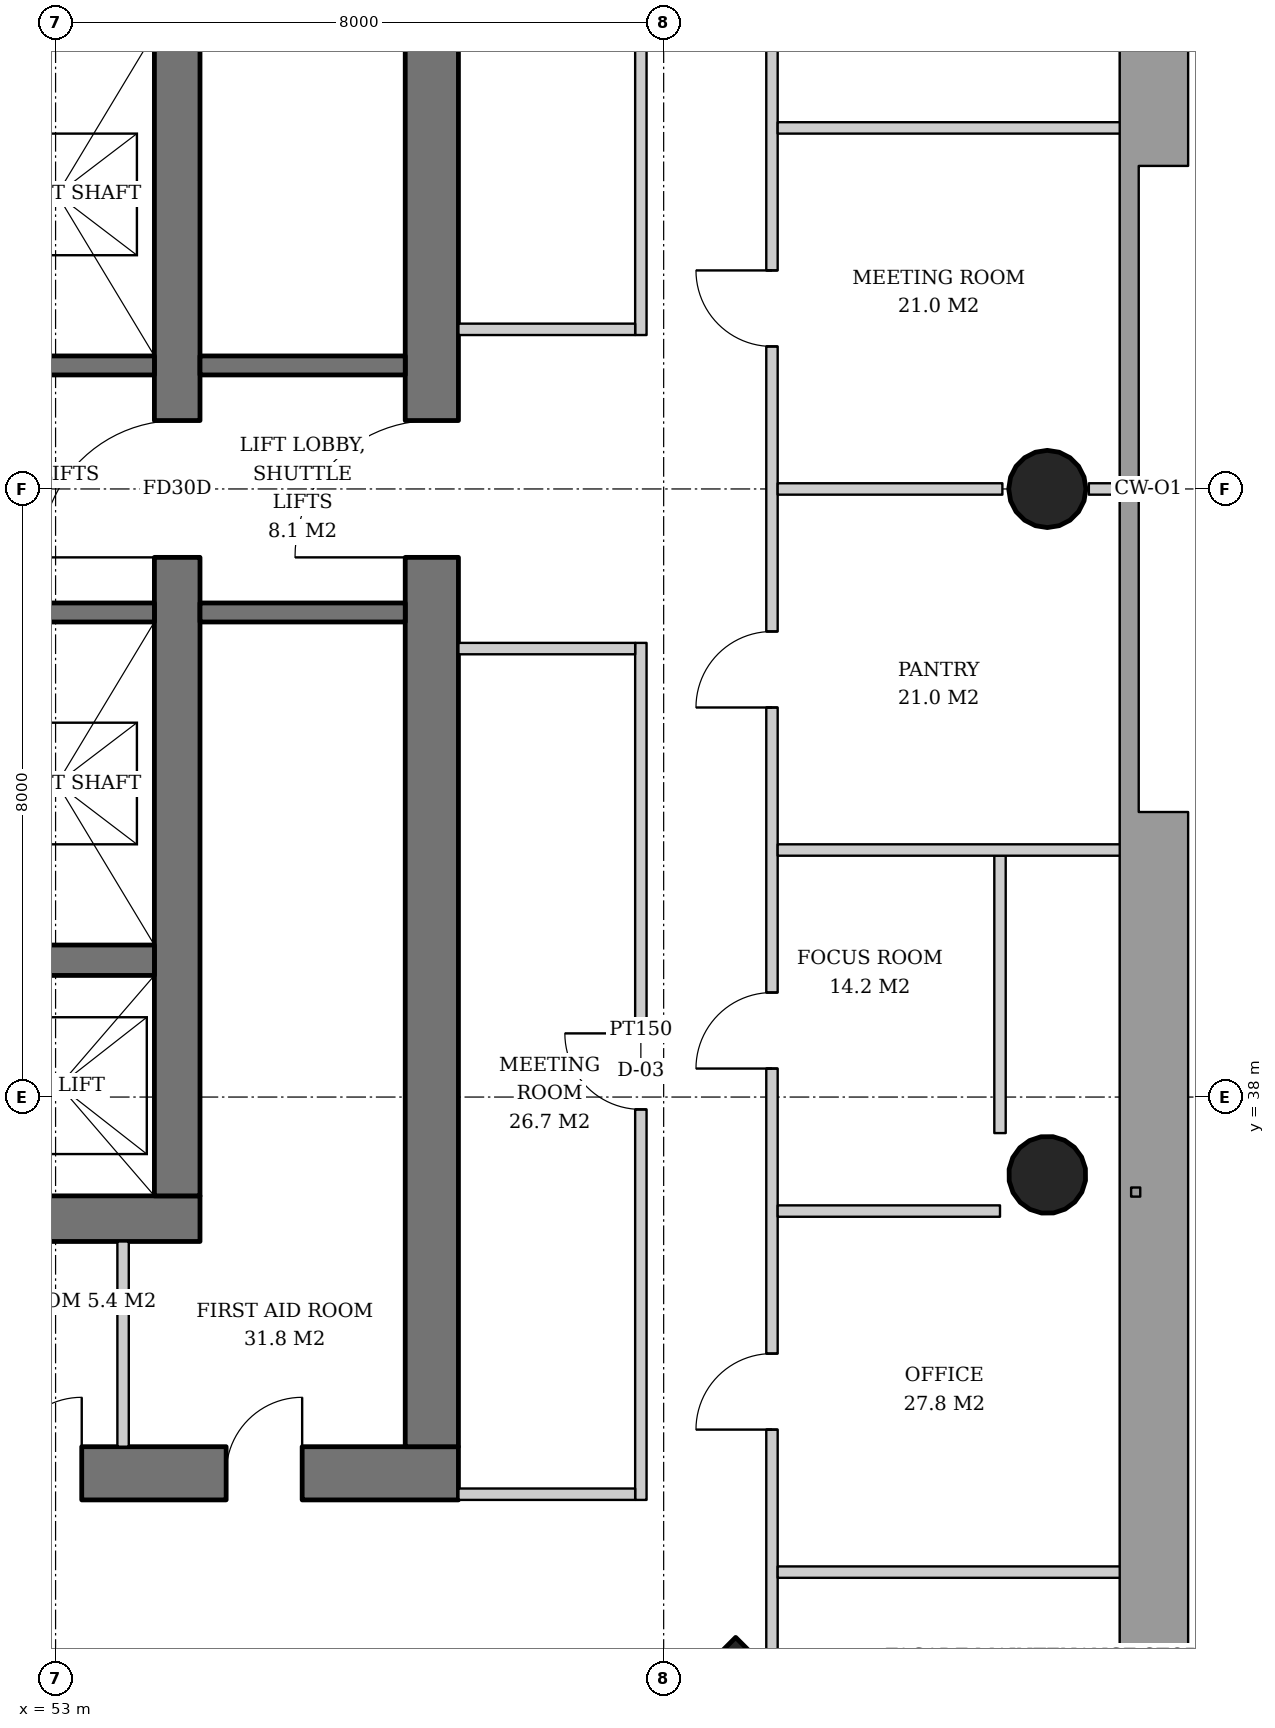
"""IFC4 building model, lengths in metres.
Left out: names, types, materials, properties, quantities, classifications, styles, units other than length and angle.
Written with IfcOpenShell. Run it as: python <this file> out.ifc"""

import sys

from ifc_helpers import new_model, si_unit, direction, frame, frame_2d, origin, origin_2d, place, context, subcontext, project, spatial, rectangle, hollow_circle, extrude, element, fill, save


model = new_model("IFC4")
c1 = context("Model", 3, precision=1e-05, world=origin(), true_north=direction((0.0, 1.0)))
c2 = subcontext(c1, "Body", "Model", "MODEL_VIEW")
j1 = project(units=[si_unit("LENGTHUNIT", "METRE"), si_unit("PLANEANGLEUNIT", "RADIAN")], contexts=[c1])
p1 = place(None, origin())
s1 = spatial("IfcSite", under=j1, at=p1, CompositionType="ELEMENT")
p2 = place(p1, origin())
s2 = spatial("IfcBuilding", under=s1, at=p2, CompositionType="ELEMENT")
p3 = place(p2, frame((0.0, 0.0, 112.2)))
s3 = spatial("IfcBuildingStorey", under=s2, at=p3, CompositionType="ELEMENT", Elevation=112.2)
p4 = place(p3, frame((66.086, 36.957, 0.0), z_axis=(-0.031910269556, 0.015987237665, 0.999362868496), x_axis=(-0.447933021895, -0.894067115991, 0.0)))
e1 = element("IfcColumn", 1, at=p4, inside=s3, PredefinedType="COLUMN", context=c2, shape_type="SweptSolid", body=[
    extrude(hollow_circle(Radius=0.508, WallThickness=0.04, at=origin_2d()), origin(), (0.0, 0.0, 1.0), 3.802),
])
p5 = place(p3, frame((66.086, 46.0, 0.0), z_axis=(-0.031914348339, 0.0, 0.999490607445), x_axis=(0.0, -1.0, 0.0)))
e2 = element("IfcColumn", 2, at=p5, inside=s3, PredefinedType="COLUMN", context=c2, shape_type="SweptSolid", body=[
    extrude(hollow_circle(Radius=0.508, WallThickness=0.04, at=origin_2d()), origin(), (0.0, 0.0, 1.0), 3.802),
])
p6 = place(p3, frame((61.986, 29.014, 0.0), z_axis=(-0.031898107953, 0.031898107953, 0.998981992539), x_axis=(-0.707106781187, -0.707106781187, 0.0)))
e3 = element("IfcColumn", 3, at=p6, inside=s3, PredefinedType="COLUMN", context=c2, shape_type="SweptSolid", body=[
    extrude(rectangle(XDim=2.6, YDim=2.6, at=origin_2d()), origin(), (0.0, 0.0, 1.0), 3.804),
])
p7 = place(p3, frame((35.1, 36.4, 0.0), z_axis=(0.0, 0.0, 1.0), x_axis=(1.0, 0.0, 0.0)))
e4 = element("IfcWall", 4, at=p7, inside=s3, PredefinedType="SHEAR", context=c2, shape_type="SweptSolid", body=[
    extrude(rectangle(XDim=19.8, YDim=0.6, at=frame_2d((9.9, 0.0))), origin(), (0.0, 0.0, 1.0), 3.8),
])
p8 = place(p7, frame((3.9, 0.0, 0.0)))
e5 = element("IfcOpeningElement", 5, at=p8, cuts=e4, PredefinedType="OPENING", context=c2, shape_type="SweptSolid", body=[
    extrude(rectangle(XDim=1.0, YDim=2.1, at=frame_2d((0.5, 1.05))), frame((0.0, 0.31, 0.0), z_axis=(0.0, -1.0, 0.0), x_axis=(1.0, 0.0, 0.0)), (0.0, 0.0, 1.0), 0.62),
])
p9 = place(p7, frame((15.35, 0.0, 0.0)))
e6 = element("IfcOpeningElement", 6, at=p9, cuts=e4, PredefinedType="OPENING", context=c2, shape_type="SweptSolid", body=[
    extrude(rectangle(XDim=1.0, YDim=2.1, at=frame_2d((0.5, 1.05))), frame((0.0, 0.31, 0.0), z_axis=(0.0, -1.0, 0.0), x_axis=(1.0, 0.0, 0.0)), (0.0, 0.0, 1.0), 0.62),
])
p10 = place(p3, frame((54.6, 36.7, 0.0), z_axis=(0.0, 0.0, 1.0), x_axis=(0.0, 1.0, 0.0)))
e7 = element("IfcWall", 7, at=p10, inside=s3, PredefinedType="SHEAR", context=c2, shape_type="SweptSolid", body=[
    extrude(rectangle(XDim=18.6, YDim=0.6, at=frame_2d((9.3, 0.0))), origin(), (0.0, 0.0, 1.0), 3.8),
])
p11 = place(p10, frame((8.4, 0.0, 0.0)))
e8 = element("IfcOpeningElement", 8, at=p11, cuts=e7, PredefinedType="OPENING", context=c2, shape_type="SweptSolid", body=[
    extrude(rectangle(XDim=1.8, YDim=2.4, at=frame_2d((0.9, 1.2))), frame((0.0, 0.31, 0.0), z_axis=(0.0, -1.0, 0.0), x_axis=(1.0, 0.0, 0.0)), (0.0, 0.0, 1.0), 0.62),
])
p12 = place(p3, frame((31.7, 33.05, 0.0), z_axis=(0.0, 0.0, 1.0), x_axis=(1.0, 0.0, 0.0)))
e9 = element("IfcWall", 9, at=p12, inside=s3, PredefinedType="SHEAR", context=c2, shape_type="SweptSolid", body=[
    extrude(rectangle(XDim=26.6, YDim=0.7, at=frame_2d((13.3, 0.0))), origin(), (0.0, 0.0, 1.0), 3.8),
])
p13 = place(p12, frame((7.3, 0.0, 0.0)))
e10 = element("IfcOpeningElement", 10, at=p13, cuts=e9, PredefinedType="OPENING", context=c2, shape_type="SweptSolid", body=[
    extrude(rectangle(XDim=1.0, YDim=2.1, at=frame_2d((0.5, 1.05))), frame((0.0, 0.36, 0.0), z_axis=(0.0, -1.0, 0.0), x_axis=(1.0, 0.0, 0.0)), (0.0, 0.0, 1.0), 0.72),
])
p14 = place(p12, frame((18.75, 0.0, 0.0)))
e11 = element("IfcOpeningElement", 11, at=p14, cuts=e9, PredefinedType="OPENING", context=c2, shape_type="SweptSolid", body=[
    extrude(rectangle(XDim=1.0, YDim=2.1, at=frame_2d((0.5, 1.05))), frame((0.0, 0.36, 0.0), z_axis=(0.0, -1.0, 0.0), x_axis=(1.0, 0.0, 0.0)), (0.0, 0.0, 1.0), 0.72),
])
p15 = place(p12, frame((1.85, 0.0, 0.0)))
e12 = element("IfcOpeningElement", 12, at=p15, cuts=e9, PredefinedType="OPENING", context=c2, shape_type="SweptSolid", body=[
    extrude(rectangle(XDim=1.0, YDim=2.1, at=frame_2d((0.5, 1.05))), frame((0.0, 0.36, 0.0), z_axis=(0.0, -1.0, 0.0), x_axis=(1.0, 0.0, 0.0)), (0.0, 0.0, 1.0), 0.72),
])
p16 = place(p12, frame((4.7, 0.0, 0.0)))
e13 = element("IfcOpeningElement", 13, at=p16, cuts=e9, PredefinedType="OPENING", context=c2, shape_type="SweptSolid", body=[
    extrude(rectangle(XDim=1.0, YDim=2.1, at=frame_2d((0.5, 1.05))), frame((0.0, 0.36, 0.0), z_axis=(0.0, -1.0, 0.0), x_axis=(1.0, 0.0, 0.0)), (0.0, 0.0, 1.0), 0.72),
])
p17 = place(p12, frame((12.44, 0.0, 0.0)))
e14 = element("IfcOpeningElement", 14, at=p17, cuts=e9, PredefinedType="OPENING", context=c2, shape_type="SweptSolid", body=[
    extrude(rectangle(XDim=1.0, YDim=2.1, at=frame_2d((0.5, 1.05))), frame((0.0, 0.36, 0.0), z_axis=(0.0, -1.0, 0.0), x_axis=(1.0, 0.0, 0.0)), (0.0, 0.0, 1.0), 0.72),
])
p18 = place(p12, frame((20.644, 0.0, 0.0)))
e15 = element("IfcOpeningElement", 15, at=p18, cuts=e9, PredefinedType="OPENING", context=c2, shape_type="SweptSolid", body=[
    extrude(rectangle(XDim=1.0, YDim=2.1, at=frame_2d((0.5, 1.05))), frame((0.0, 0.36, 0.0), z_axis=(0.0, -1.0, 0.0), x_axis=(1.0, 0.0, 0.0)), (0.0, 0.0, 1.0), 0.72),
])
p19 = place(p12, frame((23.544, 0.0, 0.0)))
e16 = element("IfcOpeningElement", 16, at=p19, cuts=e9, PredefinedType="OPENING", context=c2, shape_type="SweptSolid", body=[
    extrude(rectangle(XDim=1.0, YDim=2.1, at=frame_2d((0.5, 1.05))), frame((0.0, 0.36, 0.0), z_axis=(0.0, -1.0, 0.0), x_axis=(1.0, 0.0, 0.0)), (0.0, 0.0, 1.0), 0.72),
])
p20 = place(p3, frame((57.95, 33.4, 0.0), z_axis=(0.0, 0.0, 1.0), x_axis=(0.0, 1.0, 0.0)))
e17 = element("IfcWall", 17, at=p20, inside=s3, PredefinedType="SHEAR", context=c2, shape_type="SweptSolid", body=[
    extrude(rectangle(XDim=25.2, YDim=0.7, at=frame_2d((12.6, 0.0))), origin(), (0.0, 0.0, 1.0), 3.8),
])
p21 = place(p20, frame((11.7, 0.0, 0.0)))
e18 = element("IfcOpeningElement", 18, at=p21, cuts=e17, PredefinedType="OPENING", context=c2, shape_type="SweptSolid", body=[
    extrude(rectangle(XDim=1.8, YDim=2.4, at=frame_2d((0.9, 1.2))), frame((0.0, 0.36, 0.0), z_axis=(0.0, -1.0, 0.0), x_axis=(1.0, 0.0, 0.0)), (0.0, 0.0, 1.0), 0.72),
])
p22 = place(p3, frame((35.7, 39.8, 0.0), z_axis=(0.0, 0.0, 1.0), x_axis=(1.0, 0.0, 0.0)))
e19 = element("IfcWall", 19, at=p22, inside=s3, PredefinedType="SHEAR", context=c2, shape_type="SweptSolid", body=[
    extrude(rectangle(XDim=18.6, YDim=0.4, at=frame_2d((9.3, 0.0))), origin(), (0.0, 0.0, 1.0), 3.8),
])
for number, where, z_axis, x_axis in (
    (20, (48.93, 47.625, 0.0), (0.0, 0.0, 1.0), (1.0, 0.0, 0.0)),
    (21, (48.93, 44.375, 0.0), (0.0, 0.0, 1.0), (1.0, 0.0, 0.0)),
):
    element("IfcWall", number, at=place(p3, frame(where, z_axis=z_axis, x_axis=x_axis)), inside=s3, PredefinedType="SHEAR", context=c2, shape_type="SweptSolid", body=[
        extrude(rectangle(XDim=5.37, YDim=0.25, at=frame_2d((2.685, 0.0))), origin(), (0.0, 0.0, 1.0), 3.8),
    ])
for number, where, z_axis, x_axis in (
    (22, (54.9, 44.375, 0.0), (0.0, 0.0, 1.0), (1.0, 0.0, 0.0)),
    (23, (54.9, 47.625, 0.0), (0.0, 0.0, 1.0), (1.0, 0.0, 0.0)),
):
    element("IfcWall", number, at=place(p3, frame(where, z_axis=z_axis, x_axis=x_axis)), inside=s3, PredefinedType="SOLIDWALL", context=c2, shape_type="SweptSolid", body=[
        extrude(rectangle(XDim=2.7, YDim=0.25, at=frame_2d((1.35, 0.0))), origin(), (0.0, 0.0, 1.0), 3.62),
    ])
p23 = place(p3, frame((53.888, 33.4, 0.0), z_axis=(0.0, 0.0, 1.0), x_axis=(0.0, 1.0, 0.0)))
e24 = element("IfcWall", 24, at=p23, inside=s3, PredefinedType="SOLIDWALL", context=c2, shape_type="SweptSolid", body=[
    extrude(rectangle(XDim=2.7, YDim=0.15, at=frame_2d((1.35, 0.0))), origin(), (0.0, 0.0, 1.0), 3.62),
])
p24 = place(p3, frame((60.7, 32.7, 0.0), z_axis=(0.0, 0.0, 1.0), x_axis=(0.0, 1.0, 0.0)))
e25 = element("IfcWall", 25, at=p24, inside=s3, PredefinedType="PARTITIONING", context=c2, shape_type="SweptSolid", body=[
    extrude(rectangle(XDim=11.275, YDim=0.15, at=frame_2d((5.638, 0.0))), origin(), (0.0, 0.0, 1.0), 2.72),
])
p25 = place(p24, frame((5.137, 0.0, 0.0)))
e26 = element("IfcOpeningElement", 26, at=p25, cuts=e25, PredefinedType="OPENING", context=c2, shape_type="SweptSolid", body=[
    extrude(rectangle(XDim=1.0, YDim=2.1, at=frame_2d((0.5, 1.05))), frame((0.0, 0.085, 0.0), z_axis=(0.0, -1.0, 0.0), x_axis=(1.0, 0.0, 0.0)), (0.0, 0.0, 1.0), 0.17),
])
for number, where, z_axis, x_axis in (
    (27, (58.3, 32.775, 0.0), (0.0, 0.0, 1.0), (1.0, 0.0, 0.0)),
    (28, (58.3, 43.9, 0.0), (0.0, 0.0, 1.0), (1.0, 0.0, 0.0)),
):
    element("IfcWall", number, at=place(p3, frame(where, z_axis=z_axis, x_axis=x_axis)), inside=s3, PredefinedType="PARTITIONING", context=c2, shape_type="SweptSolid", body=[
        extrude(rectangle(XDim=2.325, YDim=0.15, at=frame_2d((1.163, 0.0))), origin(), (0.0, 0.0, 1.0), 3.62),
    ])
p26 = place(p3, frame((60.7, 48.025, 0.0), z_axis=(0.0, 0.0, 1.0), x_axis=(0.0, 1.0, 0.0)))
e29 = element("IfcWall", 29, at=p26, inside=s3, PredefinedType="PARTITIONING", context=c2, shape_type="SweptSolid", body=[
    extrude(rectangle(XDim=11.275, YDim=0.15, at=frame_2d((5.638, 0.0))), origin(), (0.0, 0.0, 1.0), 2.806),
])
p27 = place(p26, frame((5.137, 0.0, 0.0)))
e30 = element("IfcOpeningElement", 30, at=p27, cuts=e29, PredefinedType="OPENING", context=c2, shape_type="SweptSolid", body=[
    extrude(rectangle(XDim=1.0, YDim=2.1, at=frame_2d((0.5, 1.05))), frame((0.0, 0.085, 0.0), z_axis=(0.0, -1.0, 0.0), x_axis=(1.0, 0.0, 0.0)), (0.0, 0.0, 1.0), 0.17),
])
p28 = place(p3, frame((58.3, 48.1, 0.0), z_axis=(0.0, 0.0, 1.0), x_axis=(1.0, 0.0, 0.0)))
e31 = element("IfcWall", 31, at=p28, inside=s3, PredefinedType="PARTITIONING", context=c2, shape_type="SweptSolid", body=[
    extrude(rectangle(XDim=2.325, YDim=0.15, at=frame_2d((1.163, 0.0))), origin(), (0.0, 0.0, 1.0), 3.62),
])
p29 = place(p3, frame((65.425, 37.526, 0.0), z_axis=(0.0, 0.0, 1.0), x_axis=(0.0, 1.0, 0.0)))
e32 = element("IfcWall", 32, at=p29, inside=s3, PredefinedType="PARTITIONING", context=c2, shape_type="SweptSolid", body=[
    extrude(rectangle(XDim=3.649, YDim=0.15, at=frame_2d((1.825, 0.0))), origin(), (0.0, 0.0, 1.0), 3.62),
])
p30 = place(p3, frame((62.425, 30.489, 0.0), z_axis=(0.0, 0.0, 1.0), x_axis=(0.0, 1.0, 0.0)))
e33 = element("IfcWall", 33, at=p30, inside=s3, PredefinedType="PARTITIONING", context=c2, shape_type="SweptSolid", body=[
    extrude(rectangle(XDim=31.023, YDim=0.15, at=frame_2d((15.511, 0.0))), origin(), (0.0, 0.0, 1.0), 2.72),
])
p31 = place(p30, frame((3.136, 0.0, 0.0)))
e34 = element("IfcOpeningElement", 34, at=p31, cuts=e33, PredefinedType="OPENING", context=c2, shape_type="SweptSolid", body=[
    extrude(rectangle(XDim=1.0, YDim=2.1, at=frame_2d((0.5, 1.05))), frame((0.0, 0.085, 0.0), z_axis=(0.0, -1.0, 0.0), x_axis=(1.0, 0.0, 0.0)), (0.0, 0.0, 1.0), 0.17),
])
p32 = place(p30, frame((7.886, 0.0, 0.0)))
e35 = element("IfcOpeningElement", 35, at=p32, cuts=e33, PredefinedType="OPENING", context=c2, shape_type="SweptSolid", body=[
    extrude(rectangle(XDim=1.0, YDim=2.1, at=frame_2d((0.5, 1.05))), frame((0.0, 0.085, 0.0), z_axis=(0.0, -1.0, 0.0), x_axis=(1.0, 0.0, 0.0)), (0.0, 0.0, 1.0), 0.17),
])
p33 = place(p30, frame((12.636, 0.0, 0.0)))
e36 = element("IfcOpeningElement", 36, at=p33, cuts=e33, PredefinedType="OPENING", context=c2, shape_type="SweptSolid", body=[
    extrude(rectangle(XDim=1.0, YDim=2.1, at=frame_2d((0.5, 1.05))), frame((0.0, 0.085, 0.0), z_axis=(0.0, -1.0, 0.0), x_axis=(1.0, 0.0, 0.0)), (0.0, 0.0, 1.0), 0.17),
])
p34 = place(p30, frame((17.386, 0.0, 0.0)))
e37 = element("IfcOpeningElement", 37, at=p34, cuts=e33, PredefinedType="OPENING", context=c2, shape_type="SweptSolid", body=[
    extrude(rectangle(XDim=1.0, YDim=2.1, at=frame_2d((0.5, 1.05))), frame((0.0, 0.085, 0.0), z_axis=(0.0, -1.0, 0.0), x_axis=(1.0, 0.0, 0.0)), (0.0, 0.0, 1.0), 0.17),
])
p35 = place(p30, frame((22.136, 0.0, 0.0)))
e38 = element("IfcOpeningElement", 38, at=p35, cuts=e33, PredefinedType="OPENING", context=c2, shape_type="SweptSolid", body=[
    extrude(rectangle(XDim=1.0, YDim=2.1, at=frame_2d((0.5, 1.05))), frame((0.0, 0.085, 0.0), z_axis=(0.0, -1.0, 0.0), x_axis=(1.0, 0.0, 0.0)), (0.0, 0.0, 1.0), 0.17),
])
p36 = place(p3, frame((62.5, 31.75, 0.0), z_axis=(0.0, 0.0, 1.0), x_axis=(1.0, 0.0, 0.0)))
e39 = element("IfcWall", 39, at=p36, inside=s3, PredefinedType="PARTITIONING", context=c2, shape_type="SweptSolid", body=[
    extrude(rectangle(XDim=4.54, YDim=0.15, at=frame_2d((2.27, 0.0))), origin(), (0.0, 0.0, 1.0), 2.82),
])
p37 = place(p3, frame((62.5, 36.5, 0.0), z_axis=(0.0, 0.0, 1.0), x_axis=(1.0, 0.0, 0.0)))
e40 = element("IfcWall", 40, at=p37, inside=s3, PredefinedType="PARTITIONING", context=c2, shape_type="SweptSolid", body=[
    extrude(rectangle(XDim=2.925, YDim=0.15, at=frame_2d((1.462, 0.0))), origin(), (0.0, 0.0, 1.0), 3.62),
])
p38 = place(p3, frame((62.5, 41.25, 0.0), z_axis=(0.0, 0.0, 1.0), x_axis=(1.0, 0.0, 0.0)))
e41 = element("IfcWall", 41, at=p38, inside=s3, PredefinedType="PARTITIONING", context=c2, shape_type="SweptSolid", body=[
    extrude(rectangle(XDim=4.54, YDim=0.15, at=frame_2d((2.27, 0.0))), origin(), (0.0, 0.0, 1.0), 2.82),
])
p39 = place(p3, frame((62.5, 46.0, 0.0), z_axis=(0.0, 0.0, 1.0), x_axis=(1.0, 0.0, 0.0)))
e42 = element("IfcWall", 42, at=p39, inside=s3, PredefinedType="PARTITIONING", context=c2, shape_type="SweptSolid", body=[
    extrude(rectangle(XDim=2.956, YDim=0.15, at=frame_2d((1.478, 0.0))), origin(), (0.0, 0.0, 1.0), 3.62),
])
p40 = place(p3, frame((66.594, 46.0, 0.0), z_axis=(0.0, 0.0, 1.0), x_axis=(1.0, 0.0, 0.0)))
e43 = element("IfcWall", 43, at=p40, inside=s3, PredefinedType="PARTITIONING", context=c2, shape_type="SweptSolid", body=[
    extrude(rectangle(XDim=0.446, YDim=0.15, at=frame_2d((0.223, 0.0))), origin(), (0.0, 0.0, 1.0), 3.62),
])
p41 = place(p3, frame((62.5, 50.75, 0.0), z_axis=(0.0, 0.0, 1.0), x_axis=(1.0, 0.0, 0.0)))
e44 = element("IfcWall", 44, at=p41, inside=s3, PredefinedType="PARTITIONING", context=c2, shape_type="SweptSolid", body=[
    extrude(rectangle(XDim=4.54, YDim=0.15, at=frame_2d((2.27, 0.0))), origin(), (0.0, 0.0, 1.0), 2.82),
])
p42 = place(p11, origin())
e45 = element("IfcDoor", 45, at=p42, inside=s3, OperationType="DOUBLE_DOOR_SINGLE_SWING", PredefinedType="DOOR", context=c2, shape_type="SweptSolid", body=[
    extrude(rectangle(XDim=1.8, YDim=2.4, at=frame_2d((0.9, 1.2))), frame((0.0, 0.025, 0.0), z_axis=(0.0, -1.0, 0.0), x_axis=(1.0, 0.0, 0.0)), (0.0, 0.0, 1.0), 0.05),
])
fill(e8, e45)
p43 = place(p21, origin())
e46 = element("IfcDoor", 46, at=p43, inside=s3, OperationType="DOUBLE_DOOR_SINGLE_SWING", PredefinedType="DOOR", context=c2, shape_type="SweptSolid", body=[
    extrude(rectangle(XDim=1.8, YDim=2.4, at=frame_2d((0.9, 1.2))), frame((0.0, 0.025, 0.0), z_axis=(0.0, -1.0, 0.0), x_axis=(1.0, 0.0, 0.0)), (0.0, 0.0, 1.0), 0.05),
])
fill(e18, e46)
p44 = place(p18, origin())
e47 = element("IfcDoor", 47, at=p44, inside=s3, OperationType="SINGLE_SWING_RIGHT", PredefinedType="DOOR", context=c2, shape_type="SweptSolid", body=[
    extrude(rectangle(XDim=1.0, YDim=2.1, at=frame_2d((0.5, 1.05))), frame((0.0, 0.34, 0.0), z_axis=(0.0, -1.0, 0.0), x_axis=(1.0, 0.0, 0.0)), (0.0, 0.0, 1.0), 0.05),
])
fill(e15, e47)
p45 = place(p19, origin())
e48 = element("IfcDoor", 48, at=p45, inside=s3, OperationType="SINGLE_SWING_RIGHT", PredefinedType="DOOR", context=c2, shape_type="SweptSolid", body=[
    extrude(rectangle(XDim=1.0, YDim=2.1, at=frame_2d((0.5, 1.05))), frame((0.0, 0.34, 0.0), z_axis=(0.0, -1.0, 0.0), x_axis=(1.0, 0.0, 0.0)), (0.0, 0.0, 1.0), 0.05),
])
fill(e16, e48)
p46 = place(p25, origin())
e49 = element("IfcDoor", 49, at=p46, inside=s3, OperationType="SINGLE_SWING_RIGHT", PredefinedType="DOOR", context=c2, shape_type="SweptSolid", body=[
    extrude(rectangle(XDim=1.0, YDim=2.1, at=frame_2d((0.5, 1.05))), frame((0.0, 0.025, 0.0), z_axis=(0.0, -1.0, 0.0), x_axis=(1.0, 0.0, 0.0)), (0.0, 0.0, 1.0), 0.05),
])
fill(e26, e49)
p47 = place(p31, origin())
e50 = element("IfcDoor", 50, at=p47, inside=s3, OperationType="SINGLE_SWING_LEFT", PredefinedType="DOOR", context=c2, shape_type="SweptSolid", body=[
    extrude(rectangle(XDim=1.0, YDim=2.1, at=frame_2d((0.5, 1.05))), frame((0.0, 0.025, 0.0), z_axis=(0.0, -1.0, 0.0), x_axis=(1.0, 0.0, 0.0)), (0.0, 0.0, 1.0), 0.05),
])
fill(e34, e50)
p48 = place(p32, origin())
e51 = element("IfcDoor", 51, at=p48, inside=s3, OperationType="SINGLE_SWING_LEFT", PredefinedType="DOOR", context=c2, shape_type="SweptSolid", body=[
    extrude(rectangle(XDim=1.0, YDim=2.1, at=frame_2d((0.5, 1.05))), frame((0.0, 0.025, 0.0), z_axis=(0.0, -1.0, 0.0), x_axis=(1.0, 0.0, 0.0)), (0.0, 0.0, 1.0), 0.05),
])
fill(e35, e51)
p49 = place(p33, origin())
e52 = element("IfcDoor", 52, at=p49, inside=s3, OperationType="SINGLE_SWING_LEFT", PredefinedType="DOOR", context=c2, shape_type="SweptSolid", body=[
    extrude(rectangle(XDim=1.0, YDim=2.1, at=frame_2d((0.5, 1.05))), frame((0.0, 0.025, 0.0), z_axis=(0.0, -1.0, 0.0), x_axis=(1.0, 0.0, 0.0)), (0.0, 0.0, 1.0), 0.05),
])
fill(e36, e52)
p50 = place(p34, origin())
e53 = element("IfcDoor", 53, at=p50, inside=s3, OperationType="SINGLE_SWING_RIGHT", PredefinedType="DOOR", context=c2, shape_type="SweptSolid", body=[
    extrude(rectangle(XDim=1.0, YDim=2.1, at=frame_2d((0.5, 1.05))), frame((0.0, 0.025, 0.0), z_axis=(0.0, -1.0, 0.0), x_axis=(1.0, 0.0, 0.0)), (0.0, 0.0, 1.0), 0.05),
])
fill(e37, e53)
save(model, sys.argv[1])
